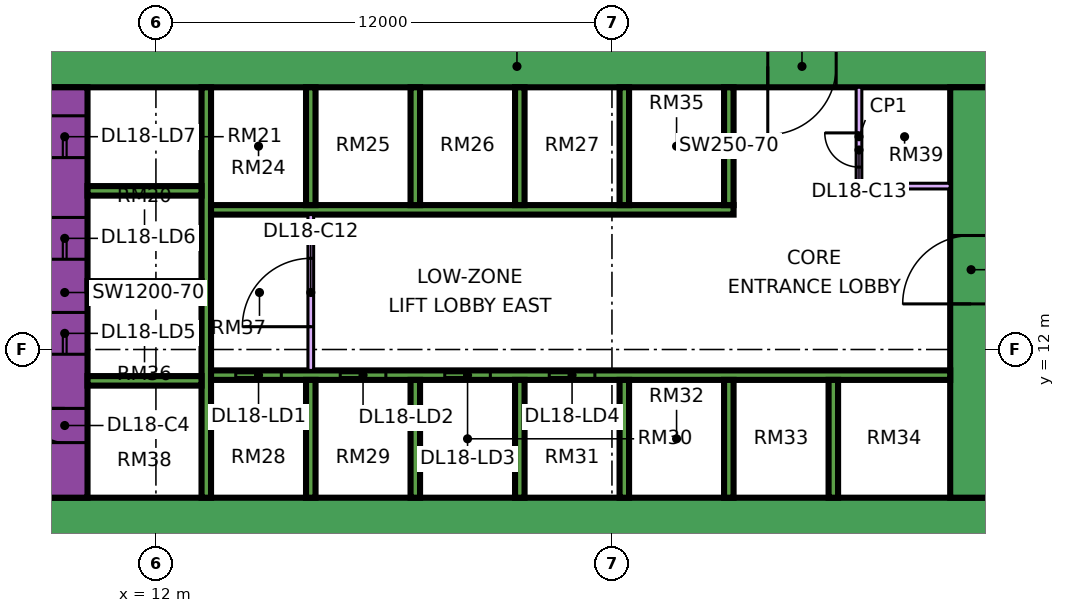
"""IFC4 building model, lengths in metres.
Left out: names, types, materials, properties, quantities, classifications, styles, units other than length and angle.
Written with IfcOpenShell. Run it as: python <this file> out.ifc"""

import sys

from ifc_helpers import new_model, si_unit, direction, frame, frame_2d, origin, place, context, subcontext, project, spatial, rectangle, extrude, element, fill, save


model = new_model("IFC4")
c1 = context("Model", 3, precision=1e-05, world=origin(), true_north=direction((0.0, 1.0)))
c2 = subcontext(c1, "Body", "Model", "MODEL_VIEW")
j1 = project(units=[si_unit("LENGTHUNIT", "METRE"), si_unit("PLANEANGLEUNIT", "RADIAN")], contexts=[c1])
p1 = place(None, origin())
s1 = spatial("IfcSite", under=j1, at=p1, CompositionType="ELEMENT")
p2 = place(p1, origin())
s2 = spatial("IfcBuilding", under=s1, at=p2, CompositionType="ELEMENT")
p3 = place(p2, frame((0.0, 0.0, 82.65)))
s3 = spatial("IfcBuildingStorey", under=s2, at=p3, CompositionType="ELEMENT", Elevation=82.65)
p4 = place(p3, frame((9.0, 7.55, 0.0), z_axis=(0.0, 0.0, 1.0), x_axis=(1.0, 0.0, 0.0)))
e1 = element("IfcWall", 1, at=p4, inside=s3, PredefinedType="SHEAR", context=c2, shape_type="SweptSolid", body=[
    extrude(rectangle(XDim=25.0, YDim=1.1, at=frame_2d((12.5, 0.0))), origin(), (0.0, 0.0, 1.0), 3.75),
])
p5 = place(p3, frame((9.0, 19.45, 0.0), z_axis=(0.0, 0.0, 1.0), x_axis=(1.0, 0.0, 0.0)))
e2 = element("IfcWall", 2, at=p5, inside=s3, PredefinedType="SHEAR", context=c2, shape_type="SweptSolid", body=[
    extrude(rectangle(XDim=25.0, YDim=1.1, at=frame_2d((12.5, 0.0))), origin(), (0.0, 0.0, 1.0), 3.75),
])
p6 = place(p5, frame((19.1, 0.0, 0.0)))
e3 = element("IfcOpeningElement", 3, at=p6, cuts=e2, PredefinedType="OPENING", context=c2, shape_type="SweptSolid", body=[
    extrude(rectangle(XDim=1.8, YDim=2.4, at=frame_2d((0.9, 1.2))), frame((0.0, 0.56, 0.0), z_axis=(0.0, -1.0, 0.0), x_axis=(1.0, 0.0, 0.0)), (0.0, 0.0, 1.0), 1.12),
])
p7 = place(p3, frame((9.6, 8.1, 0.0), z_axis=(0.0, 0.0, 1.0), x_axis=(0.0, 1.0, 0.0)))
e4 = element("IfcWall", 4, at=p7, inside=s3, PredefinedType="SHEAR", context=c2, shape_type="SweptSolid", body=[
    extrude(rectangle(XDim=10.8, YDim=1.2, at=frame_2d((5.4, 0.0))), origin(), (0.0, 0.0, 1.0), 3.75),
])
p8 = place(p7, frame((3.775, 0.0, 0.0)))
e5 = element("IfcOpeningElement", 5, at=p8, cuts=e4, PredefinedType="OPENING", context=c2, shape_type="SweptSolid", body=[
    extrude(rectangle(XDim=1.1, YDim=2.2, at=frame_2d((0.55, 1.1))), frame((0.0, 0.61, 0.0), z_axis=(0.0, -1.0, 0.0), x_axis=(1.0, 0.0, 0.0)), (0.0, 0.0, 1.0), 1.22),
])
p9 = place(p7, frame((6.275, 0.0, 0.0)))
e6 = element("IfcOpeningElement", 6, at=p9, cuts=e4, PredefinedType="OPENING", context=c2, shape_type="SweptSolid", body=[
    extrude(rectangle(XDim=1.1, YDim=2.2, at=frame_2d((0.55, 1.1))), frame((0.0, 0.61, 0.0), z_axis=(0.0, -1.0, 0.0), x_axis=(1.0, 0.0, 0.0)), (0.0, 0.0, 1.0), 1.22),
])
p10 = place(p7, frame((8.95, 0.0, 0.0)))
e7 = element("IfcOpeningElement", 7, at=p10, cuts=e4, PredefinedType="OPENING", context=c2, shape_type="SweptSolid", body=[
    extrude(rectangle(XDim=1.1, YDim=2.2, at=frame_2d((0.55, 1.1))), frame((0.0, 0.61, 0.0), z_axis=(0.0, -1.0, 0.0), x_axis=(1.0, 0.0, 0.0)), (0.0, 0.0, 1.0), 1.22),
])
p11 = place(p7, frame((1.45, 0.0, 0.0)))
e8 = element("IfcOpeningElement", 8, at=p11, cuts=e4, PredefinedType="OPENING", context=c2, shape_type="SweptSolid", body=[
    extrude(rectangle(XDim=0.9, YDim=2.1, at=frame_2d((0.45, 1.05))), frame((0.0, 0.61, 0.0), z_axis=(0.0, -1.0, 0.0), x_axis=(1.0, 0.0, 0.0)), (0.0, 0.0, 1.0), 1.22),
])
p12 = place(p3, frame((33.45, 8.1, 0.0), z_axis=(0.0, 0.0, 1.0), x_axis=(0.0, 1.0, 0.0)))
e9 = element("IfcWall", 9, at=p12, inside=s3, PredefinedType="SHEAR", context=c2, shape_type="SweptSolid", body=[
    extrude(rectangle(XDim=10.8, YDim=1.1, at=frame_2d((5.4, 0.0))), origin(), (0.0, 0.0, 1.0), 3.75),
])
p13 = place(p12, frame((5.1, 0.0, 0.0)))
e10 = element("IfcOpeningElement", 10, at=p13, cuts=e9, PredefinedType="OPENING", context=c2, shape_type="SweptSolid", body=[
    extrude(rectangle(XDim=1.8, YDim=2.4, at=frame_2d((0.9, 1.2))), frame((0.0, 0.56, 0.0), z_axis=(0.0, -1.0, 0.0), x_axis=(1.0, 0.0, 0.0)), (0.0, 0.0, 1.0), 1.12),
])
p14 = place(p3, frame((13.325, 8.1, 0.0), z_axis=(0.0, 0.0, 1.0), x_axis=(0.0, 1.0, 0.0)))
e11 = element("IfcWall", 11, at=p14, inside=s3, PredefinedType="SHEAR", context=c2, shape_type="SweptSolid", body=[
    extrude(rectangle(XDim=10.8, YDim=0.25, at=frame_2d((5.4, 0.0))), origin(), (0.0, 0.0, 1.0), 3.75),
])
p15 = place(p3, frame((13.45, 11.325, 0.0), z_axis=(0.0, 0.0, 1.0), x_axis=(1.0, 0.0, 0.0)))
e12 = element("IfcWall", 12, at=p15, inside=s3, PredefinedType="SHEAR", context=c2, shape_type="SweptSolid", body=[
    extrude(rectangle(XDim=19.45, YDim=0.25, at=frame_2d((9.725, 0.0))), origin(), (0.0, 0.0, 1.0), 3.75),
])
p16 = place(p15, frame((0.65, 0.0, 0.0)))
e13 = element("IfcOpeningElement", 13, at=p16, cuts=e12, PredefinedType="OPENING", context=c2, shape_type="SweptSolid", body=[
    extrude(rectangle(XDim=1.2, YDim=2.2, at=frame_2d((0.6, 1.1))), frame((0.0, 0.135, 0.0), z_axis=(0.0, -1.0, 0.0), x_axis=(1.0, 0.0, 0.0)), (0.0, 0.0, 1.0), 0.27),
])
p17 = place(p15, frame((3.4, 0.0, 0.0)))
e14 = element("IfcOpeningElement", 14, at=p17, cuts=e12, PredefinedType="OPENING", context=c2, shape_type="SweptSolid", body=[
    extrude(rectangle(XDim=1.2, YDim=2.2, at=frame_2d((0.6, 1.1))), frame((0.0, 0.135, 0.0), z_axis=(0.0, -1.0, 0.0), x_axis=(1.0, 0.0, 0.0)), (0.0, 0.0, 1.0), 0.27),
])
p18 = place(p15, frame((6.15, 0.0, 0.0)))
e15 = element("IfcOpeningElement", 15, at=p18, cuts=e12, PredefinedType="OPENING", context=c2, shape_type="SweptSolid", body=[
    extrude(rectangle(XDim=1.2, YDim=2.2, at=frame_2d((0.6, 1.1))), frame((0.0, 0.135, 0.0), z_axis=(0.0, -1.0, 0.0), x_axis=(1.0, 0.0, 0.0)), (0.0, 0.0, 1.0), 0.27),
])
p19 = place(p15, frame((8.9, 0.0, 0.0)))
e16 = element("IfcOpeningElement", 16, at=p19, cuts=e12, PredefinedType="OPENING", context=c2, shape_type="SweptSolid", body=[
    extrude(rectangle(XDim=1.2, YDim=2.2, at=frame_2d((0.6, 1.1))), frame((0.0, 0.135, 0.0), z_axis=(0.0, -1.0, 0.0), x_axis=(1.0, 0.0, 0.0)), (0.0, 0.0, 1.0), 0.27),
])
p20 = place(p3, frame((13.45, 15.675, 0.0), z_axis=(0.0, 0.0, 1.0), x_axis=(1.0, 0.0, 0.0)))
e17 = element("IfcWall", 17, at=p20, inside=s3, PredefinedType="SHEAR", context=c2, shape_type="SweptSolid", body=[
    extrude(rectangle(XDim=13.75, YDim=0.25, at=frame_2d((6.875, 0.0))), origin(), (0.0, 0.0, 1.0), 3.75),
])
for number, where, z_axis, x_axis in (
    (18, (10.2, 11.175, 0.0), (0.0, 0.0, 1.0), (1.0, 0.0, 0.0)),
    (19, (10.2, 13.675, 0.0), (0.0, 0.0, 1.0), (1.0, 0.0, 0.0)),
    (20, (10.2, 16.175, 0.0), (0.0, 0.0, 1.0), (1.0, 0.0, 0.0)),
):
    element("IfcWall", number, at=place(p3, frame(where, z_axis=z_axis, x_axis=x_axis)), inside=s3, PredefinedType="SHEAR", context=c2, shape_type="SweptSolid", body=[
        extrude(rectangle(XDim=3.0, YDim=0.25, at=frame_2d((1.5, 0.0))), origin(), (0.0, 0.0, 1.0), 3.75),
    ])
for number, where, z_axis, x_axis in (
    (21, (16.075, 8.1, 0.0), (0.0, 0.0, 1.0), (0.0, 1.0, 0.0)),
    (22, (18.825, 8.1, 0.0), (0.0, 0.0, 1.0), (0.0, 1.0, 0.0)),
    (23, (21.575, 8.1, 0.0), (0.0, 0.0, 1.0), (0.0, 1.0, 0.0)),
    (24, (24.325, 8.1, 0.0), (0.0, 0.0, 1.0), (0.0, 1.0, 0.0)),
    (25, (27.075, 8.1, 0.0), (0.0, 0.0, 1.0), (0.0, 1.0, 0.0)),
    (26, (29.825, 8.1, 0.0), (0.0, 0.0, 1.0), (0.0, 1.0, 0.0)),
    (27, (16.075, 15.8, 0.0), (0.0, 0.0, 1.0), (0.0, 1.0, 0.0)),
    (28, (18.825, 15.8, 0.0), (0.0, 0.0, 1.0), (0.0, 1.0, 0.0)),
    (29, (21.575, 15.8, 0.0), (0.0, 0.0, 1.0), (0.0, 1.0, 0.0)),
    (30, (24.325, 15.8, 0.0), (0.0, 0.0, 1.0), (0.0, 1.0, 0.0)),
    (31, (27.075, 15.8, 0.0), (0.0, 0.0, 1.0), (0.0, 1.0, 0.0)),
):
    element("IfcWall", number, at=place(p3, frame(where, z_axis=z_axis, x_axis=x_axis)), inside=s3, PredefinedType="SHEAR", context=c2, shape_type="SweptSolid", body=[
        extrude(rectangle(XDim=3.1, YDim=0.25, at=frame_2d((1.55, 0.0))), origin(), (0.0, 0.0, 1.0), 3.75),
    ])
p21 = place(p3, frame((-1.447, 12.553, 0.0), z_axis=(0.0, 0.0, 1.0), x_axis=(0.707106781187, -0.707106781187, 0.0)))
e32 = element("IfcWall", 32, at=p21, inside=s3, PredefinedType="SOLIDWALL", context=c2, shape_type="SweptSolid", body=[
    extrude(rectangle(XDim=19.799, YDim=0.15, at=frame_2d((9.899, 0.0))), origin(), (0.0, 0.0, 1.0), 3.3),
])
p22 = place(p21, frame((2.212, 0.0, 0.45)))
e33 = element("IfcOpeningElement", 33, at=p22, cuts=e32, PredefinedType="OPENING", context=c2, shape_type="SweptSolid", body=[
    extrude(rectangle(XDim=3.0, YDim=2.4, at=frame_2d((1.5, 1.2))), frame((0.0, 0.085, 0.0), z_axis=(0.0, -1.0, 0.0), x_axis=(1.0, 0.0, 0.0)), (0.0, 0.0, 1.0), 0.17),
])
p23 = place(p21, frame((10.216, 0.0, 0.45)))
e34 = element("IfcOpeningElement", 34, at=p23, cuts=e32, PredefinedType="OPENING", context=c2, shape_type="SweptSolid", body=[
    extrude(rectangle(XDim=3.0, YDim=2.4, at=frame_2d((1.5, 1.2))), frame((0.0, 0.085, 0.0), z_axis=(0.0, -1.0, 0.0), x_axis=(1.0, 0.0, 0.0)), (0.0, 0.0, 1.0), 0.17),
])
p24 = place(p3, frame((16.075, 11.45, 0.0), z_axis=(0.0, 0.0, 1.0), x_axis=(0.0, 1.0, 0.0)))
e35 = element("IfcWall", 35, at=p24, inside=s3, PredefinedType="PARTITIONING", context=c2, shape_type="SweptSolid", body=[
    extrude(rectangle(XDim=4.1, YDim=0.15, at=frame_2d((2.05, 0.0))), origin(), (0.0, 0.0, 1.0), 3.3),
])
p25 = place(p24, frame((1.15, 0.0, 0.0)))
e36 = element("IfcOpeningElement", 36, at=p25, cuts=e35, PredefinedType="OPENING", context=c2, shape_type="SweptSolid", body=[
    extrude(rectangle(XDim=1.8, YDim=2.4, at=frame_2d((0.9, 1.2))), frame((0.0, 0.085, 0.0), z_axis=(0.0, -1.0, 0.0), x_axis=(1.0, 0.0, 0.0)), (0.0, 0.0, 1.0), 0.17),
])
p26 = place(p3, frame((30.5, 16.3, 0.0), z_axis=(0.0, 0.0, 1.0), x_axis=(0.0, 1.0, 0.0)))
e37 = element("IfcWall", 37, at=p26, inside=s3, PredefinedType="PARTITIONING", context=c2, shape_type="SweptSolid", body=[
    extrude(rectangle(XDim=2.6, YDim=0.15, at=frame_2d((1.3, 0.0))), origin(), (0.0, 0.0, 1.0), 3.3),
])
p27 = place(p26, frame((0.5, 0.0, 0.0)))
e38 = element("IfcOpeningElement", 38, at=p27, cuts=e37, PredefinedType="OPENING", context=c2, shape_type="SweptSolid", body=[
    extrude(rectangle(XDim=0.9, YDim=2.1, at=frame_2d((0.45, 1.05))), frame((0.0, 0.085, 0.0), z_axis=(0.0, -1.0, 0.0), x_axis=(1.0, 0.0, 0.0)), (0.0, 0.0, 1.0), 0.17),
])
p28 = place(p3, frame((30.5, 16.3, 0.0), z_axis=(0.0, 0.0, 1.0), x_axis=(1.0, 0.0, 0.0)))
e39 = element("IfcWall", 39, at=p28, inside=s3, PredefinedType="PARTITIONING", context=c2, shape_type="SweptSolid", body=[
    extrude(rectangle(XDim=2.4, YDim=0.15, at=frame_2d((1.2, 0.0))), origin(), (0.0, 0.0, 1.0), 3.3),
])
p29 = place(p16, origin())
e40 = element("IfcDoor", 40, at=p29, inside=s3, OperationType="DOUBLE_DOOR_SLIDING", PredefinedType="DOOR", context=c2, shape_type="SweptSolid", body=[
    extrude(rectangle(XDim=1.2, YDim=2.2, at=frame_2d((0.6, 1.1))), frame((0.0, 0.025, 0.0), z_axis=(0.0, -1.0, 0.0), x_axis=(1.0, 0.0, 0.0)), (0.0, 0.0, 1.0), 0.05),
])
fill(e13, e40)
p30 = place(p17, origin())
e41 = element("IfcDoor", 41, at=p30, inside=s3, OperationType="DOUBLE_DOOR_SLIDING", PredefinedType="DOOR", context=c2, shape_type="SweptSolid", body=[
    extrude(rectangle(XDim=1.2, YDim=2.2, at=frame_2d((0.6, 1.1))), frame((0.0, 0.025, 0.0), z_axis=(0.0, -1.0, 0.0), x_axis=(1.0, 0.0, 0.0)), (0.0, 0.0, 1.0), 0.05),
])
fill(e14, e41)
p31 = place(p18, origin())
e42 = element("IfcDoor", 42, at=p31, inside=s3, OperationType="DOUBLE_DOOR_SLIDING", PredefinedType="DOOR", context=c2, shape_type="SweptSolid", body=[
    extrude(rectangle(XDim=1.2, YDim=2.2, at=frame_2d((0.6, 1.1))), frame((0.0, 0.025, 0.0), z_axis=(0.0, -1.0, 0.0), x_axis=(1.0, 0.0, 0.0)), (0.0, 0.0, 1.0), 0.05),
])
fill(e15, e42)
p32 = place(p19, origin())
e43 = element("IfcDoor", 43, at=p32, inside=s3, OperationType="DOUBLE_DOOR_SLIDING", PredefinedType="DOOR", context=c2, shape_type="SweptSolid", body=[
    extrude(rectangle(XDim=1.2, YDim=2.2, at=frame_2d((0.6, 1.1))), frame((0.0, 0.025, 0.0), z_axis=(0.0, -1.0, 0.0), x_axis=(1.0, 0.0, 0.0)), (0.0, 0.0, 1.0), 0.05),
])
fill(e16, e43)
p33 = place(p8, origin())
e44 = element("IfcDoor", 44, at=p33, inside=s3, OperationType="DOUBLE_DOOR_SLIDING", PredefinedType="DOOR", context=c2, shape_type="SweptSolid", body=[
    extrude(rectangle(XDim=1.1, YDim=2.2, at=frame_2d((0.55, 1.1))), frame((0.0, 0.025, 0.0), z_axis=(0.0, -1.0, 0.0), x_axis=(1.0, 0.0, 0.0)), (0.0, 0.0, 1.0), 0.05),
])
fill(e5, e44)
p34 = place(p9, origin())
e45 = element("IfcDoor", 45, at=p34, inside=s3, OperationType="DOUBLE_DOOR_SLIDING", PredefinedType="DOOR", context=c2, shape_type="SweptSolid", body=[
    extrude(rectangle(XDim=1.1, YDim=2.2, at=frame_2d((0.55, 1.1))), frame((0.0, 0.025, 0.0), z_axis=(0.0, -1.0, 0.0), x_axis=(1.0, 0.0, 0.0)), (0.0, 0.0, 1.0), 0.05),
])
fill(e6, e45)
p35 = place(p10, origin())
e46 = element("IfcDoor", 46, at=p35, inside=s3, OperationType="DOUBLE_DOOR_SLIDING", PredefinedType="DOOR", context=c2, shape_type="SweptSolid", body=[
    extrude(rectangle(XDim=1.1, YDim=2.2, at=frame_2d((0.55, 1.1))), frame((0.0, 0.025, 0.0), z_axis=(0.0, -1.0, 0.0), x_axis=(1.0, 0.0, 0.0)), (0.0, 0.0, 1.0), 0.05),
])
fill(e7, e46)
p36 = place(p13, origin())
e47 = element("IfcDoor", 47, at=p36, inside=s3, OperationType="DOUBLE_DOOR_SINGLE_SWING", PredefinedType="DOOR", context=c2, shape_type="SweptSolid", body=[
    extrude(rectangle(XDim=1.8, YDim=2.4, at=frame_2d((0.9, 1.2))), frame((0.0, 0.025, 0.0), z_axis=(0.0, -1.0, 0.0), x_axis=(1.0, 0.0, 0.0)), (0.0, 0.0, 1.0), 0.05),
])
fill(e10, e47)
p37 = place(p6, frame((1.8, 0.0, 0.0), z_axis=(0.0, 0.0, 1.0), x_axis=(-1.0, 0.0, 0.0)))
e48 = element("IfcDoor", 48, at=p37, inside=s3, OperationType="DOUBLE_DOOR_SINGLE_SWING", PredefinedType="DOOR", context=c2, shape_type="SweptSolid", body=[
    extrude(rectangle(XDim=1.8, YDim=2.4, at=frame_2d((0.9, 1.2))), frame((0.0, 0.025, 0.0), z_axis=(0.0, -1.0, 0.0), x_axis=(1.0, 0.0, 0.0)), (0.0, 0.0, 1.0), 0.05),
])
fill(e3, e48)
p38 = place(p11, frame((0.9, 0.0, 0.0), z_axis=(0.0, 0.0, 1.0), x_axis=(-1.0, 0.0, 0.0)))
e49 = element("IfcDoor", 49, at=p38, inside=s3, OperationType="SINGLE_SWING_RIGHT", PredefinedType="DOOR", context=c2, shape_type="SweptSolid", body=[
    extrude(rectangle(XDim=0.9, YDim=2.1, at=frame_2d((0.45, 1.05))), frame((0.0, 0.025, 0.0), z_axis=(0.0, -1.0, 0.0), x_axis=(1.0, 0.0, 0.0)), (0.0, 0.0, 1.0), 0.05),
])
fill(e8, e49)
p39 = place(p25, origin())
e50 = element("IfcDoor", 50, at=p39, inside=s3, OperationType="DOUBLE_DOOR_SINGLE_SWING", PredefinedType="DOOR", context=c2, shape_type="SweptSolid", body=[
    extrude(rectangle(XDim=1.8, YDim=2.4, at=frame_2d((0.9, 1.2))), frame((0.0, 0.025, 0.0), z_axis=(0.0, -1.0, 0.0), x_axis=(1.0, 0.0, 0.0)), (0.0, 0.0, 1.0), 0.05),
])
fill(e36, e50)
p40 = place(p27, frame((0.9, 0.0, 0.0), z_axis=(0.0, 0.0, 1.0), x_axis=(-1.0, 0.0, 0.0)))
e51 = element("IfcDoor", 51, at=p40, inside=s3, OperationType="SINGLE_SWING_RIGHT", PredefinedType="DOOR", context=c2, shape_type="SweptSolid", body=[
    extrude(rectangle(XDim=0.9, YDim=2.1, at=frame_2d((0.45, 1.05))), frame((0.0, 0.025, 0.0), z_axis=(0.0, -1.0, 0.0), x_axis=(1.0, 0.0, 0.0)), (0.0, 0.0, 1.0), 0.05),
])
fill(e38, e51)
save(model, sys.argv[1])
